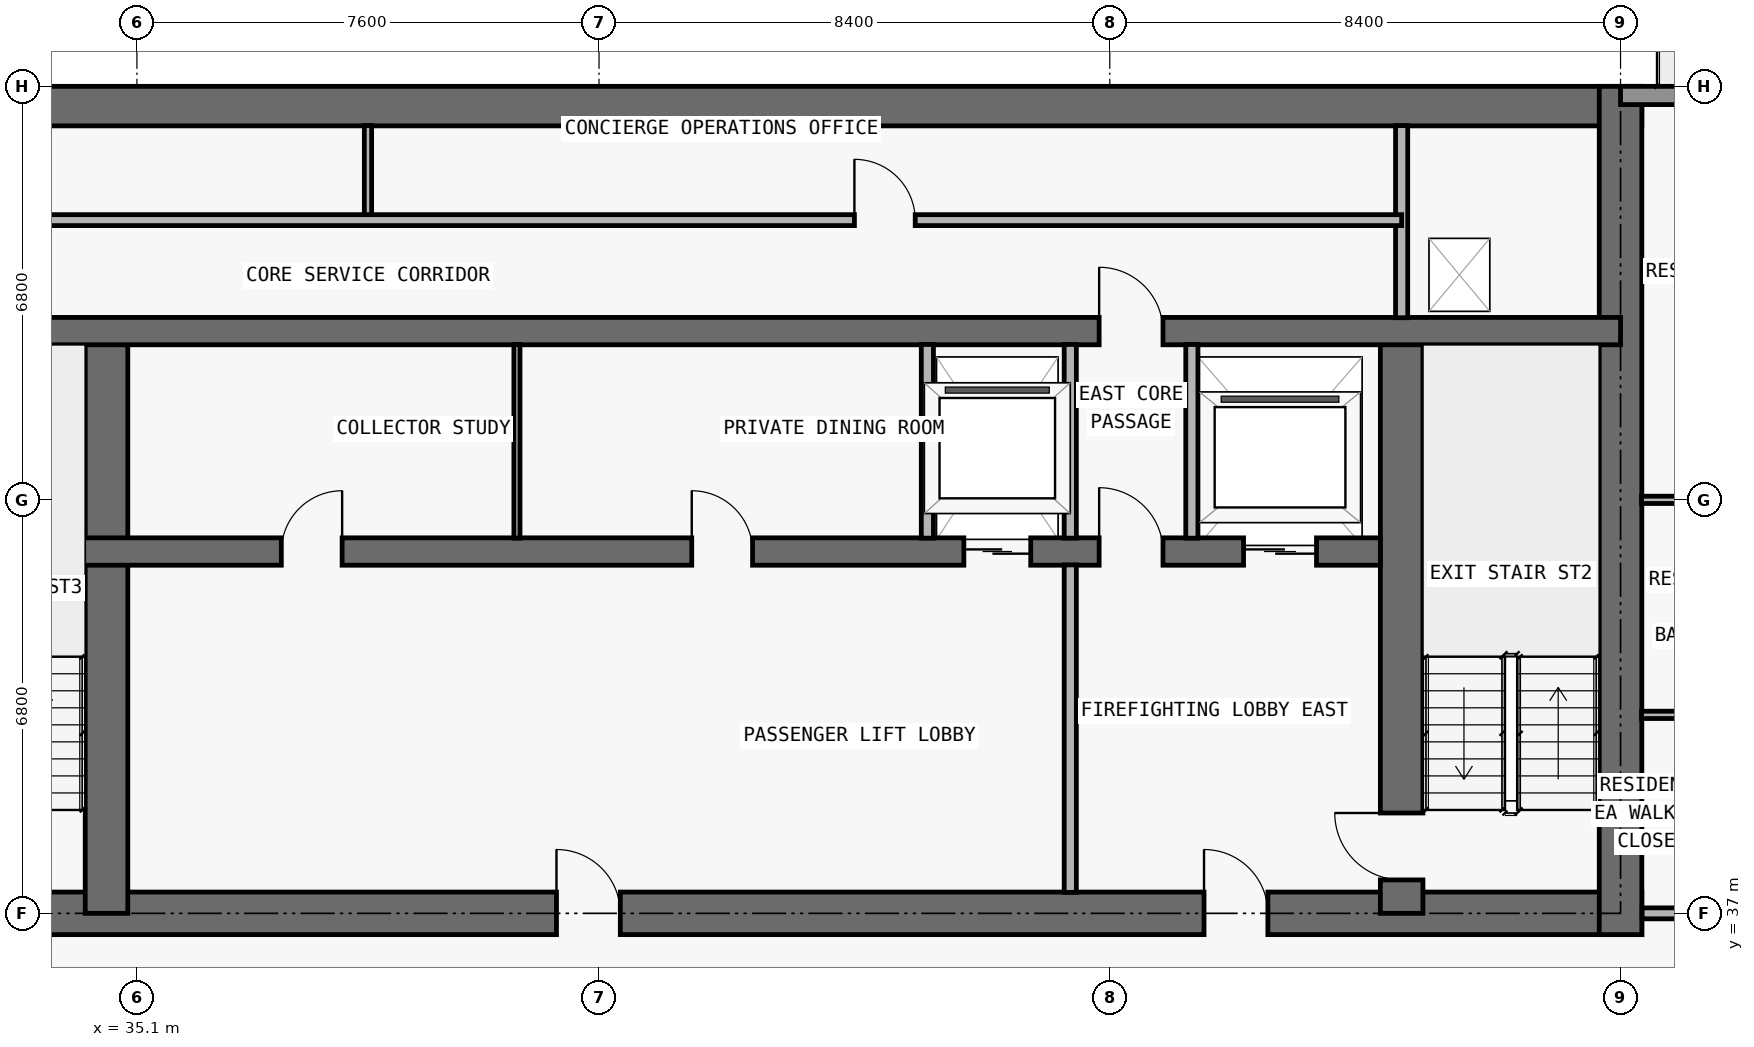
"""IFC4 building model, lengths in metres.
Left out: names, types, materials, properties, quantities, classifications, styles, units other than length and angle.
Written with IfcOpenShell. Run it as: python <this file> out.ifc"""

import sys

from ifc_helpers import new_model, si_unit, direction, frame, frame_2d, origin, place, context, subcontext, project, spatial, rectangle, extrude, element, fill, save


model = new_model("IFC4")
c1 = context("Model", 3, precision=1e-05, world=origin(), true_north=direction((0.0, 1.0)))
c2 = subcontext(c1, "Body", "Model", "MODEL_VIEW")
j1 = project(units=[si_unit("LENGTHUNIT", "METRE"), si_unit("PLANEANGLEUNIT", "RADIAN")], contexts=[c1])
p1 = place(None, origin())
s1 = spatial("IfcSite", under=j1, at=p1, CompositionType="ELEMENT")
p2 = place(p1, origin())
s2 = spatial("IfcBuilding", under=s1, at=p2, CompositionType="ELEMENT")
p3 = place(p2, frame((0.0, 0.0, 236.4)))
s3 = spatial("IfcBuildingStorey", under=s2, at=p3, CompositionType="ELEMENT", Elevation=236.4)
p4 = place(p3, frame((17.95, 37.0, 0.0), z_axis=(0.0, 0.0, 1.0), x_axis=(1.0, 0.0, 0.0)))
e1 = element("IfcWall", 1, at=p4, inside=s3, PredefinedType="SHEAR", context=c2, shape_type="SweptSolid", body=[
    extrude(rectangle(XDim=41.9, YDim=0.7, at=frame_2d((20.95, 0.0))), origin(), (0.0, 0.0, 1.0), 3.05),
])
p5 = place(p4, frame((14.35, 0.0, 0.0)))
e2 = element("IfcOpeningElement", 2, at=p5, cuts=e1, PredefinedType="OPENING", context=c2, shape_type="SweptSolid", body=[
    extrude(rectangle(XDim=1.1, YDim=2.15, at=frame_2d((0.55, 1.075))), frame((0.0, 0.36, 0.0), z_axis=(0.0, -1.0, 0.0), x_axis=(1.0, 0.0, 0.0)), (0.0, 0.0, 1.0), 0.72),
])
p6 = place(p4, frame((6.2, 0.0, 0.0)))
e3 = element("IfcOpeningElement", 3, at=p6, cuts=e1, PredefinedType="OPENING", context=c2, shape_type="SweptSolid", body=[
    extrude(rectangle(XDim=1.05, YDim=2.15, at=frame_2d((0.525, 1.075))), frame((0.0, 0.36, 0.0), z_axis=(0.0, -1.0, 0.0), x_axis=(1.0, 0.0, 0.0)), (0.0, 0.0, 1.0), 0.72),
])
p7 = place(p4, frame((34.7, 0.0, 0.0)))
e4 = element("IfcOpeningElement", 4, at=p7, cuts=e1, PredefinedType="OPENING", context=c2, shape_type="SweptSolid", body=[
    extrude(rectangle(XDim=1.05, YDim=2.15, at=frame_2d((0.525, 1.075))), frame((0.0, 0.36, 0.0), z_axis=(0.0, -1.0, 0.0), x_axis=(1.0, 0.0, 0.0)), (0.0, 0.0, 1.0), 0.72),
])
p8 = place(p4, frame((10.812, 0.0, 0.0)))
e5 = element("IfcOpeningElement", 5, at=p8, cuts=e1, PredefinedType="OPENING", context=c2, shape_type="SweptSolid", body=[
    extrude(rectangle(XDim=1.05, YDim=2.15, at=frame_2d((0.525, 1.075))), frame((0.0, 0.36, 0.0), z_axis=(0.0, -1.0, 0.0), x_axis=(1.0, 0.0, 0.0)), (0.0, 0.0, 1.0), 0.72),
])
p9 = place(p4, frame((24.05, 0.0, 0.0)))
e6 = element("IfcOpeningElement", 6, at=p9, cuts=e1, PredefinedType="OPENING", context=c2, shape_type="SweptSolid", body=[
    extrude(rectangle(XDim=1.05, YDim=2.15, at=frame_2d((0.525, 1.075))), frame((0.0, 0.36, 0.0), z_axis=(0.0, -1.0, 0.0), x_axis=(1.0, 0.0, 0.0)), (0.0, 0.0, 1.0), 0.72),
])
p10 = place(p3, frame((17.95, 50.275, 0.0), z_axis=(0.0, 0.0, 1.0), x_axis=(1.0, 0.0, 0.0)))
e7 = element("IfcWall", 7, at=p10, inside=s3, PredefinedType="SHEAR", context=c2, shape_type="SweptSolid", body=[
    extrude(rectangle(XDim=41.9, YDim=0.65, at=frame_2d((20.95, 0.0))), origin(), (0.0, 0.0, 1.0), 3.05),
])
p11 = place(p3, frame((59.5, 36.65, 0.0), z_axis=(0.0, 0.0, 1.0), x_axis=(0.0, 1.0, 0.0)))
e8 = element("IfcWall", 8, at=p11, inside=s3, PredefinedType="SHEAR", context=c2, shape_type="SweptSolid", body=[
    extrude(rectangle(XDim=13.95, YDim=0.7, at=frame_2d((6.975, 0.0))), origin(), (0.0, 0.0, 1.0), 3.05),
])
p12 = place(p3, frame((55.9, 37.0, 0.0), z_axis=(0.0, 0.0, 1.0), x_axis=(0.0, 1.0, 0.0)))
e9 = element("IfcWall", 9, at=p12, inside=s3, PredefinedType="SHEAR", context=c2, shape_type="SweptSolid", body=[
    extrude(rectangle(XDim=9.575, YDim=0.7, at=frame_2d((4.788, 0.0))), origin(), (0.0, 0.0, 1.0), 3.05),
])
p13 = place(p12, frame((0.55, 0.0, 0.0)))
e10 = element("IfcOpeningElement", 10, at=p13, cuts=e9, PredefinedType="OPENING", context=c2, shape_type="SweptSolid", body=[
    extrude(rectangle(XDim=1.1, YDim=2.15, at=frame_2d((0.55, 1.075))), frame((0.0, 0.36, 0.0), z_axis=(0.0, -1.0, 0.0), x_axis=(1.0, 0.0, 0.0)), (0.0, 0.0, 1.0), 0.72),
])
p14 = place(p3, frame((34.6, 37.0, 0.0), z_axis=(0.0, 0.0, 1.0), x_axis=(0.0, 1.0, 0.0)))
e11 = element("IfcWall", 11, at=p14, inside=s3, PredefinedType="SHEAR", context=c2, shape_type="SweptSolid", body=[
    extrude(rectangle(XDim=9.575, YDim=0.7, at=frame_2d((4.788, 0.0))), origin(), (0.0, 0.0, 1.0), 3.05),
])
p15 = place(p3, frame((22.25, 42.95, 0.0), z_axis=(0.0, 0.0, 1.0), x_axis=(1.0, 0.0, 0.0)))
e12 = element("IfcWall", 12, at=p15, inside=s3, PredefinedType="SHEAR", context=c2, shape_type="SweptSolid", body=[
    extrude(rectangle(XDim=33.3, YDim=0.45, at=frame_2d((16.65, 0.0))), origin(), (0.0, 0.0, 1.0), 3.05),
])
p16 = place(p15, frame((1.05, 0.0, 0.0)))
e13 = element("IfcOpeningElement", 13, at=p16, cuts=e12, PredefinedType="OPENING", context=c2, shape_type="SweptSolid", body=[
    extrude(rectangle(XDim=1.2, YDim=2.2, at=frame_2d((0.6, 1.1))), frame((0.0, 0.235, 0.0), z_axis=(0.0, -1.0, 0.0), x_axis=(1.0, 0.0, 0.0)), (0.0, 0.0, 1.0), 0.47),
])
p17 = place(p15, frame((31.05, 0.0, 0.0)))
e14 = element("IfcOpeningElement", 14, at=p17, cuts=e12, PredefinedType="OPENING", context=c2, shape_type="SweptSolid", body=[
    extrude(rectangle(XDim=1.2, YDim=2.2, at=frame_2d((0.6, 1.1))), frame((0.0, 0.235, 0.0), z_axis=(0.0, -1.0, 0.0), x_axis=(1.0, 0.0, 0.0)), (0.0, 0.0, 1.0), 0.47),
])
p18 = place(p15, frame((26.45, 0.0, 0.0)))
e15 = element("IfcOpeningElement", 15, at=p18, cuts=e12, PredefinedType="OPENING", context=c2, shape_type="SweptSolid", body=[
    extrude(rectangle(XDim=1.1, YDim=2.2, at=frame_2d((0.55, 1.1))), frame((0.0, 0.235, 0.0), z_axis=(0.0, -1.0, 0.0), x_axis=(1.0, 0.0, 0.0)), (0.0, 0.0, 1.0), 0.47),
])
p19 = place(p15, frame((5.95, 0.0, 0.0)))
e16 = element("IfcOpeningElement", 16, at=p19, cuts=e12, PredefinedType="OPENING", context=c2, shape_type="SweptSolid", body=[
    extrude(rectangle(XDim=1.1, YDim=2.2, at=frame_2d((0.55, 1.1))), frame((0.0, 0.235, 0.0), z_axis=(0.0, -1.0, 0.0), x_axis=(1.0, 0.0, 0.0)), (0.0, 0.0, 1.0), 0.47),
])
p20 = place(p15, frame((3.625, 0.0, 0.0)))
e17 = element("IfcOpeningElement", 17, at=p20, cuts=e12, PredefinedType="OPENING", context=c2, shape_type="SweptSolid", body=[
    extrude(rectangle(XDim=1.05, YDim=2.15, at=frame_2d((0.525, 1.075))), frame((0.0, 0.235, 0.0), z_axis=(0.0, -1.0, 0.0), x_axis=(1.0, 0.0, 0.0)), (0.0, 0.0, 1.0), 0.47),
])
p21 = place(p15, frame((28.675, 0.0, 0.0)))
e18 = element("IfcOpeningElement", 18, at=p21, cuts=e12, PredefinedType="OPENING", context=c2, shape_type="SweptSolid", body=[
    extrude(rectangle(XDim=1.05, YDim=2.15, at=frame_2d((0.525, 1.075))), frame((0.0, 0.235, 0.0), z_axis=(0.0, -1.0, 0.0), x_axis=(1.0, 0.0, 0.0)), (0.0, 0.0, 1.0), 0.47),
])
p22 = place(p15, frame((15.225, 0.0, 0.0)))
e19 = element("IfcOpeningElement", 19, at=p22, cuts=e12, PredefinedType="OPENING", context=c2, shape_type="SweptSolid", body=[
    extrude(rectangle(XDim=1.0, YDim=2.2, at=frame_2d((0.5, 1.1))), frame((0.0, 0.235, 0.0), z_axis=(0.0, -1.0, 0.0), x_axis=(1.0, 0.0, 0.0)), (0.0, 0.0, 1.0), 0.47),
])
p23 = place(p15, frame((21.975, 0.0, 0.0)))
e20 = element("IfcOpeningElement", 20, at=p23, cuts=e12, PredefinedType="OPENING", context=c2, shape_type="SweptSolid", body=[
    extrude(rectangle(XDim=1.0, YDim=2.2, at=frame_2d((0.5, 1.1))), frame((0.0, 0.235, 0.0), z_axis=(0.0, -1.0, 0.0), x_axis=(1.0, 0.0, 0.0)), (0.0, 0.0, 1.0), 0.47),
])
p24 = place(p3, frame((18.3, 46.575, 0.0), z_axis=(0.0, 0.0, 1.0), x_axis=(1.0, 0.0, 0.0)))
e21 = element("IfcWall", 21, at=p24, inside=s3, PredefinedType="SHEAR", context=c2, shape_type="SweptSolid", body=[
    extrude(rectangle(XDim=41.2, YDim=0.45, at=frame_2d((20.6, 0.0))), origin(), (0.0, 0.0, 1.0), 3.05),
])
p25 = place(p24, frame((7.575, 0.0, 0.0)))
e22 = element("IfcOpeningElement", 22, at=p25, cuts=e21, PredefinedType="OPENING", context=c2, shape_type="SweptSolid", body=[
    extrude(rectangle(XDim=1.05, YDim=2.15, at=frame_2d((0.525, 1.075))), frame((0.0, 0.235, 0.0), z_axis=(0.0, -1.0, 0.0), x_axis=(1.0, 0.0, 0.0)), (0.0, 0.0, 1.0), 0.47),
])
p26 = place(p24, frame((32.625, 0.0, 0.0)))
e23 = element("IfcOpeningElement", 23, at=p26, cuts=e21, PredefinedType="OPENING", context=c2, shape_type="SweptSolid", body=[
    extrude(rectangle(XDim=1.05, YDim=2.15, at=frame_2d((0.525, 1.075))), frame((0.0, 0.235, 0.0), z_axis=(0.0, -1.0, 0.0), x_axis=(1.0, 0.0, 0.0)), (0.0, 0.0, 1.0), 0.47),
])
p27 = place(p3, frame((59.5, 50.45, 0.0), z_axis=(0.0, 0.0, 1.0), x_axis=(1.0, 0.0, 0.0)))
e24 = element("IfcWall", 24, at=p27, inside=s3, PredefinedType="STANDARD", context=c2, shape_type="SweptSolid", body=[
    extrude(rectangle(XDim=6.2, YDim=0.3, at=frame_2d((3.1, 0.0))), origin(), (0.0, 0.0, 1.0), 3.05),
])
p28 = place(p27, frame((2.1, 0.0, 0.0)))
e25 = element("IfcOpeningElement", 25, at=p28, cuts=e24, PredefinedType="OPENING", context=c2, shape_type="SweptSolid", body=[
    extrude(rectangle(XDim=2.0, YDim=2.3, at=frame_2d((1.0, 1.15))), frame((0.0, 0.16, 0.0), z_axis=(0.0, -1.0, 0.0), x_axis=(1.0, 0.0, 0.0)), (0.0, 0.0, 1.0), 0.32),
])
p29 = place(p3, frame((38.9, 48.4, 0.0), z_axis=(0.0, 0.0, 1.0), x_axis=(0.0, 1.0, 0.0)))
e26 = element("IfcWall", 26, at=p29, inside=s3, PredefinedType="PARTITIONING", context=c2, shape_type="SweptSolid", body=[
    extrude(rectangle(XDim=1.555, YDim=0.12, at=frame_2d((0.778, 0.0))), origin(), (0.0, 0.0, 1.0), 3.05),
])
p30 = place(p3, frame((41.35, 43.17, 0.0), z_axis=(0.0, 0.0, 1.0), x_axis=(0.0, 1.0, 0.0)))
e27 = element("IfcWall", 27, at=p30, inside=s3, PredefinedType="MOVABLE", context=c2, shape_type="SweptSolid", body=[
    extrude(rectangle(XDim=3.185, YDim=0.1, at=frame_2d((1.593, 0.0))), origin(), (0.0, 0.0, 1.0), 3.05),
])
p31 = place(p3, frame((48.1, 43.17, 0.0), z_axis=(0.0, 0.0, 1.0), x_axis=(0.0, 1.0, 0.0)))
e28 = element("IfcWall", 28, at=p31, inside=s3, PredefinedType="PARTITIONING", context=c2, shape_type="SweptSolid", body=[
    extrude(rectangle(XDim=3.185, YDim=0.2, at=frame_2d((1.593, 0.0))), origin(), (0.0, 0.0, 1.0), 3.05),
])
p32 = place(p3, frame((50.45, 37.345, 0.0), z_axis=(0.0, 0.0, 1.0), x_axis=(0.0, 1.0, 0.0)))
e29 = element("IfcWall", 29, at=p32, inside=s3, PredefinedType="PARTITIONING", context=c2, shape_type="SweptSolid", body=[
    extrude(rectangle(XDim=5.385, YDim=0.2, at=frame_2d((2.692, 0.0))), origin(), (0.0, 0.0, 1.0), 3.05),
])
for number, where, z_axis, x_axis in (
    (30, (50.45, 43.17, 0.0), (0.0, 0.0, 1.0), (0.0, 1.0, 0.0)),
    (31, (52.45, 43.17, 0.0), (0.0, 0.0, 1.0), (0.0, 1.0, 0.0)),
):
    element("IfcWall", number, at=place(p3, frame(where, z_axis=z_axis, x_axis=x_axis)), inside=s3, PredefinedType="PARTITIONING", context=c2, shape_type="SweptSolid", body=[
        extrude(rectangle(XDim=3.185, YDim=0.2, at=frame_2d((1.593, 0.0))), origin(), (0.0, 0.0, 1.0), 3.05),
    ])
p33 = place(p3, frame((55.9, 46.795, 0.0), z_axis=(0.0, 0.0, 1.0), x_axis=(0.0, 1.0, 0.0)))
e32 = element("IfcWall", 32, at=p33, inside=s3, PredefinedType="PARTITIONING", context=c2, shape_type="SweptSolid", body=[
    extrude(rectangle(XDim=3.16, YDim=0.2, at=frame_2d((1.58, 0.0))), origin(), (0.0, 0.0, 1.0), 3.05),
])
p34 = place(p3, frame((59.855, 37.0, 0.0), z_axis=(0.0, 0.0, 1.0), x_axis=(1.0, 0.0, 0.0)))
e33 = element("IfcWall", 33, at=p34, inside=s3, PredefinedType="PARTITIONING", context=c2, shape_type="SweptSolid", body=[
    extrude(rectangle(XDim=5.845, YDim=0.18, at=frame_2d((2.922, 0.0))), origin(), (0.0, 0.0, 1.0), 3.05),
])
p35 = place(p34, frame((3.57, 0.0, 0.0)))
e34 = element("IfcOpeningElement", 34, at=p35, cuts=e33, PredefinedType="OPENING", context=c2, shape_type="SweptSolid", body=[
    extrude(rectangle(XDim=1.0, YDim=2.2, at=frame_2d((0.5, 1.1))), frame((0.0, 0.1, 0.0), z_axis=(0.0, -1.0, 0.0), x_axis=(1.0, 0.0, 0.0)), (0.0, 0.0, 1.0), 0.2),
])
p36 = place(p3, frame((59.845, 40.264, 0.0), z_axis=(0.0, 0.0, 1.0), x_axis=(1.0, 0.0, 0.0)))
e35 = element("IfcWall", 35, at=p36, inside=s3, PredefinedType="PARTITIONING", context=c2, shape_type="SweptSolid", body=[
    extrude(rectangle(XDim=2.305, YDim=0.12, at=frame_2d((1.152, 0.0))), origin(), (0.0, 0.0, 1.0), 3.05),
])
p37 = place(p3, frame((59.845, 43.8, 0.0), z_axis=(0.0, 0.0, 1.0), x_axis=(1.0, 0.0, 0.0)))
e36 = element("IfcWall", 36, at=p37, inside=s3, PredefinedType="PARTITIONING", context=c2, shape_type="SweptSolid", body=[
    extrude(rectangle(XDim=9.56, YDim=0.12, at=frame_2d((4.78, 0.0))), origin(), (0.0, 0.0, 1.0), 2.418),
])
p38 = place(p37, frame((3.63, 0.0, 0.0)))
e37 = element("IfcOpeningElement", 37, at=p38, cuts=e36, PredefinedType="OPENING", context=c2, shape_type="SweptSolid", body=[
    extrude(rectangle(XDim=0.9, YDim=2.15, at=frame_2d((0.45, 1.075))), frame((0.0, 0.07, 0.0), z_axis=(0.0, -1.0, 0.0), x_axis=(1.0, 0.0, 0.0)), (0.0, 0.0, 1.0), 0.14),
])
p39 = place(p37, frame((0.728, 0.0, 0.0)))
e38 = element("IfcOpeningElement", 38, at=p39, cuts=e36, PredefinedType="OPENING", context=c2, shape_type="SweptSolid", body=[
    extrude(rectangle(XDim=0.85, YDim=2.1, at=frame_2d((0.425, 1.05))), frame((0.0, 0.07, 0.0), z_axis=(0.0, -1.0, 0.0), x_axis=(1.0, 0.0, 0.0)), (0.0, 0.0, 1.0), 0.14),
])
p40 = place(p3, frame((21.9, 48.4, 0.0), z_axis=(0.0, 0.0, 1.0), x_axis=(1.0, 0.0, 0.0)))
e39 = element("IfcWall", 39, at=p40, inside=s3, PredefinedType="PARTITIONING", context=c2, shape_type="SweptSolid", body=[
    extrude(rectangle(XDim=34.0, YDim=0.18, at=frame_2d((17.0, 0.0))), origin(), (0.0, 0.0, 1.0), 3.05),
])
p41 = place(p40, frame((8.0, 0.0, 0.0)))
e40 = element("IfcOpeningElement", 40, at=p41, cuts=e39, PredefinedType="OPENING", context=c2, shape_type="SweptSolid", body=[
    extrude(rectangle(XDim=1.0, YDim=2.2, at=frame_2d((0.5, 1.1))), frame((0.0, 0.1, 0.0), z_axis=(0.0, -1.0, 0.0), x_axis=(1.0, 0.0, 0.0)), (0.0, 0.0, 1.0), 0.2),
])
p42 = place(p40, frame((25.0, 0.0, 0.0)))
e41 = element("IfcOpeningElement", 41, at=p42, cuts=e39, PredefinedType="OPENING", context=c2, shape_type="SweptSolid", body=[
    extrude(rectangle(XDim=1.0, YDim=2.2, at=frame_2d((0.5, 1.1))), frame((0.0, 0.1, 0.0), z_axis=(0.0, -1.0, 0.0), x_axis=(1.0, 0.0, 0.0)), (0.0, 0.0, 1.0), 0.2),
])
p43 = place(p17, origin())
e42 = element("IfcDoor", 42, at=p43, inside=s3, OperationType="DOUBLE_DOOR_SLIDING", PredefinedType="DOOR", context=c2, shape_type="SweptSolid", body=[
    extrude(rectangle(XDim=1.2, YDim=2.2, at=frame_2d((0.6, 1.1))), frame((0.0, 0.025, 0.0), z_axis=(0.0, -1.0, 0.0), x_axis=(1.0, 0.0, 0.0)), (0.0, 0.0, 1.0), 0.05),
])
fill(e14, e42)
p44 = place(p18, origin())
e43 = element("IfcDoor", 43, at=p44, inside=s3, OperationType="DOUBLE_DOOR_SLIDING", PredefinedType="DOOR", context=c2, shape_type="SweptSolid", body=[
    extrude(rectangle(XDim=1.1, YDim=2.2, at=frame_2d((0.55, 1.1))), frame((0.0, 0.025, 0.0), z_axis=(0.0, -1.0, 0.0), x_axis=(1.0, 0.0, 0.0)), (0.0, 0.0, 1.0), 0.05),
])
fill(e15, e43)
p45 = place(p7, origin())
e44 = element("IfcDoor", 44, at=p45, inside=s3, OperationType="SINGLE_SWING_LEFT", PredefinedType="DOOR", context=c2, shape_type="SweptSolid", body=[
    extrude(rectangle(XDim=1.05, YDim=2.15, at=frame_2d((0.525, 1.075))), frame((0.0, 0.025, 0.0), z_axis=(0.0, -1.0, 0.0), x_axis=(1.0, 0.0, 0.0)), (0.0, 0.0, 1.0), 0.05),
])
fill(e4, e44)
p46 = place(p13, origin())
e45 = element("IfcDoor", 45, at=p46, inside=s3, OperationType="SINGLE_SWING_RIGHT", PredefinedType="DOOR", context=c2, shape_type="SweptSolid", body=[
    extrude(rectangle(XDim=1.1, YDim=2.15, at=frame_2d((0.55, 1.075))), frame((0.0, 0.025, 0.0), z_axis=(0.0, -1.0, 0.0), x_axis=(1.0, 0.0, 0.0)), (0.0, 0.0, 1.0), 0.05),
])
fill(e10, e45)
p47 = place(p21, origin())
e46 = element("IfcDoor", 46, at=p47, inside=s3, OperationType="SINGLE_SWING_LEFT", PredefinedType="DOOR", context=c2, shape_type="SweptSolid", body=[
    extrude(rectangle(XDim=1.05, YDim=2.15, at=frame_2d((0.525, 1.075))), frame((0.0, 0.025, 0.0), z_axis=(0.0, -1.0, 0.0), x_axis=(1.0, 0.0, 0.0)), (0.0, 0.0, 1.0), 0.05),
])
fill(e18, e46)
p48 = place(p9, origin())
e47 = element("IfcDoor", 47, at=p48, inside=s3, OperationType="SINGLE_SWING_LEFT", PredefinedType="DOOR", context=c2, shape_type="SweptSolid", body=[
    extrude(rectangle(XDim=1.05, YDim=2.15, at=frame_2d((0.525, 1.075))), frame((0.0, 0.025, 0.0), z_axis=(0.0, -1.0, 0.0), x_axis=(1.0, 0.0, 0.0)), (0.0, 0.0, 1.0), 0.05),
])
fill(e6, e47)
p49 = place(p22, origin())
e48 = element("IfcDoor", 48, at=p49, inside=s3, OperationType="SINGLE_SWING_RIGHT", PredefinedType="DOOR", context=c2, shape_type="SweptSolid", body=[
    extrude(rectangle(XDim=1.0, YDim=2.2, at=frame_2d((0.5, 1.1))), frame((0.0, 0.025, 0.0), z_axis=(0.0, -1.0, 0.0), x_axis=(1.0, 0.0, 0.0)), (0.0, 0.0, 1.0), 0.05),
])
fill(e19, e48)
p50 = place(p23, origin())
e49 = element("IfcDoor", 49, at=p50, inside=s3, OperationType="SINGLE_SWING_LEFT", PredefinedType="DOOR", context=c2, shape_type="SweptSolid", body=[
    extrude(rectangle(XDim=1.0, YDim=2.2, at=frame_2d((0.5, 1.1))), frame((0.0, 0.025, 0.0), z_axis=(0.0, -1.0, 0.0), x_axis=(1.0, 0.0, 0.0)), (0.0, 0.0, 1.0), 0.05),
])
fill(e20, e49)
p51 = place(p26, origin())
e50 = element("IfcDoor", 50, at=p51, inside=s3, OperationType="SINGLE_SWING_LEFT", PredefinedType="DOOR", context=c2, shape_type="SweptSolid", body=[
    extrude(rectangle(XDim=1.05, YDim=2.15, at=frame_2d((0.525, 1.075))), frame((0.0, 0.025, 0.0), z_axis=(0.0, -1.0, 0.0), x_axis=(1.0, 0.0, 0.0)), (0.0, 0.0, 1.0), 0.05),
])
fill(e23, e50)
p52 = place(p42, origin())
e51 = element("IfcDoor", 51, at=p52, inside=s3, OperationType="SINGLE_SWING_LEFT", PredefinedType="DOOR", context=c2, shape_type="SweptSolid", body=[
    extrude(rectangle(XDim=1.0, YDim=2.2, at=frame_2d((0.5, 1.1))), frame((0.0, 0.025, 0.0), z_axis=(0.0, -1.0, 0.0), x_axis=(1.0, 0.0, 0.0)), (0.0, 0.0, 1.0), 0.05),
])
fill(e41, e51)
save(model, sys.argv[1])
